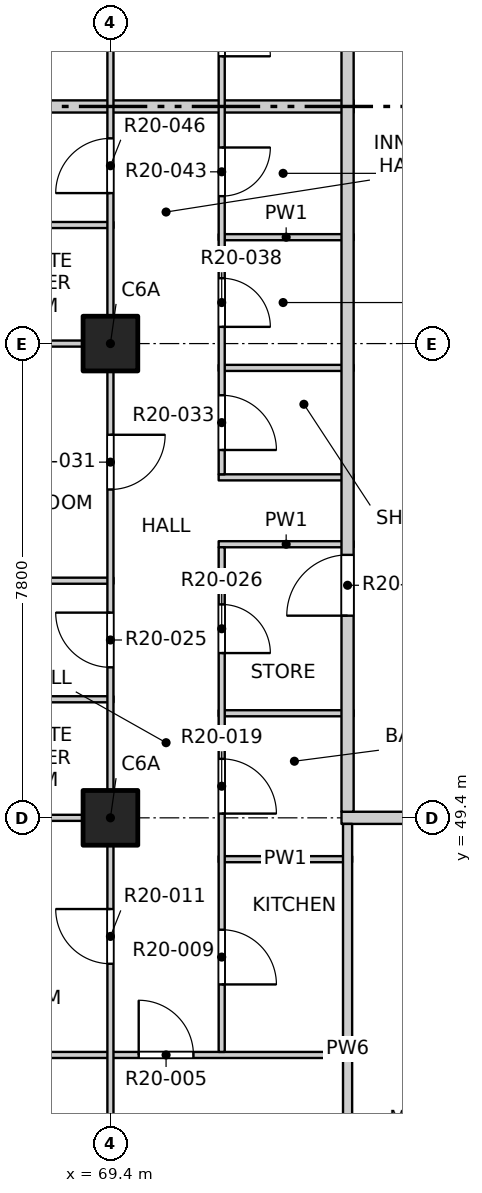
"""IFC4 building model, lengths in metres.
Left out: names, types, materials, properties, quantities, classifications, styles, units other than length and angle.
Written with IfcOpenShell. Run it as: python <this file> out.ifc"""

import sys

from ifc_helpers import new_model, si_unit, direction, frame, frame_2d, origin, origin_2d, place, context, subcontext, project, spatial, rectangle, extrude, element, fill, save


model = new_model("IFC4")
c1 = context("Model", 3, precision=1e-05, world=origin(), true_north=direction((0.0, 1.0)))
c2 = subcontext(c1, "Body", "Model", "MODEL_VIEW")
j1 = project(units=[si_unit("LENGTHUNIT", "METRE"), si_unit("PLANEANGLEUNIT", "RADIAN")], contexts=[c1])
p1 = place(None, origin())
s1 = spatial("IfcSite", under=j1, at=p1, CompositionType="ELEMENT")
p2 = place(p1, origin())
s2 = spatial("IfcBuilding", under=s1, at=p2, CompositionType="ELEMENT")
p3 = place(p2, frame((0.0, 0.0, 210.9)))
s3 = spatial("IfcBuildingStorey", under=s2, at=p3, CompositionType="ELEMENT", Elevation=210.9)
for number, where, z_axis, x_axis in (
    (1, (69.4, 49.4, -0.25), (0.0, 0.0, 1.0), (1.0, 0.0, 0.0)),
    (2, (69.4, 57.2, -0.25), (0.0, 0.0, 1.0), (1.0, 0.0, 0.0)),
):
    element("IfcColumn", number, at=place(p3, frame(where, z_axis=z_axis, x_axis=x_axis)), inside=s3, PredefinedType="COLUMN", context=c2, shape_type="SweptSolid", body=[
        extrude(rectangle(XDim=0.9, YDim=0.9, at=origin_2d()), origin(), (0.0, 0.0, 1.0), 3.4),
    ])
p4 = place(p3, frame((61.9, 45.5, 0.0), z_axis=(0.0, 0.0, 1.0), x_axis=(1.0, 0.0, 0.0)))
e3 = element("IfcWall", 3, at=p4, inside=s3, PredefinedType="PARTITIONING", context=c2, shape_type="SweptSolid", body=[
    extrude(rectangle(XDim=11.475, YDim=0.1, at=frame_2d((5.737, 0.0))), origin(), (0.0, 0.0, 1.0), 3.15),
])
p5 = place(p4, frame((7.965, 0.0, 0.0)))
e4 = element("IfcOpeningElement", 4, at=p5, cuts=e3, PredefinedType="OPENING", context=c2, shape_type="SweptSolid", body=[
    extrude(rectangle(XDim=0.9, YDim=2.1, at=frame_2d((0.45, 1.05))), frame((0.0, 0.06, 0.0), z_axis=(0.0, -1.0, 0.0), x_axis=(1.0, 0.0, 0.0)), (0.0, 0.0, 1.0), 0.12),
])
p6 = place(p3, frame((71.18, 48.72, 0.0), z_axis=(0.0, 0.0, 1.0), x_axis=(1.0, 0.0, 0.0)))
e5 = element("IfcWall", 5, at=p6, inside=s3, PredefinedType="PARTITIONING", context=c2, shape_type="SweptSolid", body=[
    extrude(rectangle(XDim=2.195, YDim=0.1, at=frame_2d((1.097, 0.0))), origin(), (0.0, 0.0, 1.0), 3.15),
])
p7 = place(p3, frame((61.9, 49.4, 0.0), z_axis=(0.0, 0.0, 1.0), x_axis=(1.0, 0.0, 0.0)))
e6 = element("IfcWall", 6, at=p7, inside=s3, PredefinedType="PARTITIONING", context=c2, shape_type="SweptSolid", body=[
    extrude(rectangle(XDim=7.55, YDim=0.1, at=frame_2d((3.775, 0.0))), origin(), (0.0, 0.0, 1.0), 3.15),
])
p8 = place(p3, frame((73.2, 49.4, 0.0), z_axis=(0.0, 0.0, 1.0), x_axis=(1.0, 0.0, 0.0)))
e7 = element("IfcWall", 7, at=p8, inside=s3, PredefinedType="PARTITIONING", context=c2, shape_type="SweptSolid", body=[
    extrude(rectangle(XDim=23.6, YDim=0.2, at=frame_2d((11.8, 0.0))), origin(), (0.0, 0.0, 1.0), 3.15),
])
p9 = place(p8, frame((1.6, 0.0, 0.0)))
e8 = element("IfcOpeningElement", 8, at=p9, cuts=e7, PredefinedType="OPENING", context=c2, shape_type="SweptSolid", body=[
    extrude(rectangle(XDim=0.9, YDim=2.1, at=frame_2d((0.45, 1.05))), frame((0.0, 0.11, 0.0), z_axis=(0.0, -1.0, 0.0), x_axis=(1.0, 0.0, 0.0)), (0.0, 0.0, 1.0), 0.22),
])
p10 = place(p8, frame((5.5, 0.0, 0.0)))
e9 = element("IfcOpeningElement", 9, at=p10, cuts=e7, PredefinedType="OPENING", context=c2, shape_type="SweptSolid", body=[
    extrude(rectangle(XDim=0.9, YDim=2.1, at=frame_2d((0.45, 1.05))), frame((0.0, 0.11, 0.0), z_axis=(0.0, -1.0, 0.0), x_axis=(1.0, 0.0, 0.0)), (0.0, 0.0, 1.0), 0.22),
])
p11 = place(p8, frame((12.375, 0.0, 0.0)))
e10 = element("IfcOpeningElement", 10, at=p11, cuts=e7, PredefinedType="OPENING", context=c2, shape_type="SweptSolid", body=[
    extrude(rectangle(XDim=1.2, YDim=2.1, at=frame_2d((0.6, 1.05))), frame((0.0, 0.11, 0.0), z_axis=(0.0, -1.0, 0.0), x_axis=(1.0, 0.0, 0.0)), (0.0, 0.0, 1.0), 0.22),
])
p12 = place(p8, frame((20.15, 0.0, 0.0)))
e11 = element("IfcOpeningElement", 11, at=p12, cuts=e7, PredefinedType="OPENING", context=c2, shape_type="SweptSolid", body=[
    extrude(rectangle(XDim=1.2, YDim=2.1, at=frame_2d((0.6, 1.05))), frame((0.0, 0.11, 0.0), z_axis=(0.0, -1.0, 0.0), x_axis=(1.0, 0.0, 0.0)), (0.0, 0.0, 1.0), 0.22),
])
p13 = place(p3, frame((71.18, 51.12, 0.0), z_axis=(0.0, 0.0, 1.0), x_axis=(1.0, 0.0, 0.0)))
e12 = element("IfcWall", 12, at=p13, inside=s3, PredefinedType="PARTITIONING", context=c2, shape_type="SweptSolid", body=[
    extrude(rectangle(XDim=2.22, YDim=0.1, at=frame_2d((1.11, 0.0))), origin(), (0.0, 0.0, 1.0), 3.15),
])
p14 = place(p3, frame((66.05, 51.35, 0.0), z_axis=(0.0, 0.0, 1.0), x_axis=(1.0, 0.0, 0.0)))
e13 = element("IfcWall", 13, at=p14, inside=s3, PredefinedType="PARTITIONING", context=c2, shape_type="SweptSolid", body=[
    extrude(rectangle(XDim=3.4, YDim=0.1, at=frame_2d((1.7, 0.0))), origin(), (0.0, 0.0, 1.0), 3.15),
])
p15 = place(p3, frame((61.9, 53.3, 0.0), z_axis=(0.0, 0.0, 1.0), x_axis=(1.0, 0.0, 0.0)))
e14 = element("IfcWall", 14, at=p15, inside=s3, PredefinedType="PARTITIONING", context=c2, shape_type="SweptSolid", body=[
    extrude(rectangle(XDim=7.55, YDim=0.1, at=frame_2d((3.775, 0.0))), origin(), (0.0, 0.0, 1.0), 3.15),
])
for number, where, z_axis, x_axis in (
    (15, (71.18, 53.9, 0.0), (0.0, 0.0, 1.0), (1.0, 0.0, 0.0)),
    (16, (71.18, 55.0, 0.0), (0.0, 0.0, 1.0), (1.0, 0.0, 0.0)),
    (17, (71.18, 56.8, 0.0), (0.0, 0.0, 1.0), (1.0, 0.0, 0.0)),
):
    element("IfcWall", number, at=place(p3, frame(where, z_axis=z_axis, x_axis=x_axis)), inside=s3, PredefinedType="PARTITIONING", context=c2, shape_type="SweptSolid", body=[
        extrude(rectangle(XDim=2.22, YDim=0.1, at=frame_2d((1.11, 0.0))), origin(), (0.0, 0.0, 1.0), 3.15),
    ])
p16 = place(p3, frame((61.9, 57.2, 0.0), z_axis=(0.0, 0.0, 1.0), x_axis=(1.0, 0.0, 0.0)))
e18 = element("IfcWall", 18, at=p16, inside=s3, PredefinedType="PARTITIONING", context=c2, shape_type="SweptSolid", body=[
    extrude(rectangle(XDim=7.55, YDim=0.1, at=frame_2d((3.775, 0.0))), origin(), (0.0, 0.0, 1.0), 3.15),
])
p17 = place(p3, frame((71.18, 58.95, 0.0), z_axis=(0.0, 0.0, 1.0), x_axis=(1.0, 0.0, 0.0)))
e19 = element("IfcWall", 19, at=p17, inside=s3, PredefinedType="PARTITIONING", context=c2, shape_type="SweptSolid", body=[
    extrude(rectangle(XDim=2.22, YDim=0.1, at=frame_2d((1.11, 0.0))), origin(), (0.0, 0.0, 1.0), 3.15),
])
p18 = place(p3, frame((66.05, 59.15, 0.0), z_axis=(0.0, 0.0, 1.0), x_axis=(1.0, 0.0, 0.0)))
e20 = element("IfcWall", 20, at=p18, inside=s3, PredefinedType="PARTITIONING", context=c2, shape_type="SweptSolid", body=[
    extrude(rectangle(XDim=3.4, YDim=0.1, at=frame_2d((1.7, 0.0))), origin(), (0.0, 0.0, 1.0), 3.15),
])
p19 = place(p3, frame((61.9, 61.1, 0.0), z_axis=(0.0, 0.0, 1.0), x_axis=(1.0, 0.0, 0.0)))
e21 = element("IfcWall", 21, at=p19, inside=s3, PredefinedType="PARTITIONING", context=c2, shape_type="SweptSolid", body=[
    extrude(rectangle(XDim=11.5, YDim=0.2, at=frame_2d((5.75, 0.0))), origin(), (0.0, 0.0, 1.0), 2.55),
])
p20 = place(p3, frame((69.4, 41.9, 0.0), z_axis=(0.0, 0.0, 1.0), x_axis=(0.0, 1.0, 0.0)))
e22 = element("IfcWall", 22, at=p20, inside=s3, PredefinedType="PARTITIONING", context=c2, shape_type="SweptSolid", body=[
    extrude(rectangle(XDim=46.2, YDim=0.1, at=frame_2d((23.1, 0.0))), origin(), (0.0, 0.0, 1.0), 3.15),
])
p21 = place(p20, frame((1.2, 0.0, 0.0)))
e23 = element("IfcOpeningElement", 23, at=p21, cuts=e22, PredefinedType="OPENING", context=c2, shape_type="SweptSolid", body=[
    extrude(rectangle(XDim=0.9, YDim=2.1, at=frame_2d((0.45, 1.05))), frame((0.0, 0.06, 0.0), z_axis=(0.0, -1.0, 0.0), x_axis=(1.0, 0.0, 0.0)), (0.0, 0.0, 1.0), 0.12),
])
p22 = place(p20, frame((5.1, 0.0, 0.0)))
e24 = element("IfcOpeningElement", 24, at=p22, cuts=e22, PredefinedType="OPENING", context=c2, shape_type="SweptSolid", body=[
    extrude(rectangle(XDim=0.9, YDim=2.1, at=frame_2d((0.45, 1.05))), frame((0.0, 0.06, 0.0), z_axis=(0.0, -1.0, 0.0), x_axis=(1.0, 0.0, 0.0)), (0.0, 0.0, 1.0), 0.12),
])
p23 = place(p20, frame((9.975, 0.0, 0.0)))
e25 = element("IfcOpeningElement", 25, at=p23, cuts=e22, PredefinedType="OPENING", context=c2, shape_type="SweptSolid", body=[
    extrude(rectangle(XDim=0.9, YDim=2.1, at=frame_2d((0.45, 1.05))), frame((0.0, 0.06, 0.0), z_axis=(0.0, -1.0, 0.0), x_axis=(1.0, 0.0, 0.0)), (0.0, 0.0, 1.0), 0.12),
])
p24 = place(p20, frame((12.9, 0.0, 0.0)))
e26 = element("IfcOpeningElement", 26, at=p24, cuts=e22, PredefinedType="OPENING", context=c2, shape_type="SweptSolid", body=[
    extrude(rectangle(XDim=0.9, YDim=2.1, at=frame_2d((0.45, 1.05))), frame((0.0, 0.06, 0.0), z_axis=(0.0, -1.0, 0.0), x_axis=(1.0, 0.0, 0.0)), (0.0, 0.0, 1.0), 0.12),
])
p25 = place(p20, frame((17.775, 0.0, 0.0)))
e27 = element("IfcOpeningElement", 27, at=p25, cuts=e22, PredefinedType="OPENING", context=c2, shape_type="SweptSolid", body=[
    extrude(rectangle(XDim=0.9, YDim=2.1, at=frame_2d((0.45, 1.05))), frame((0.0, 0.06, 0.0), z_axis=(0.0, -1.0, 0.0), x_axis=(1.0, 0.0, 0.0)), (0.0, 0.0, 1.0), 0.12),
])
p26 = place(p20, frame((21.625, 0.0, 0.0)))
e28 = element("IfcOpeningElement", 28, at=p26, cuts=e22, PredefinedType="OPENING", context=c2, shape_type="SweptSolid", body=[
    extrude(rectangle(XDim=0.9, YDim=2.1, at=frame_2d((0.45, 1.05))), frame((0.0, 0.06, 0.0), z_axis=(0.0, -1.0, 0.0), x_axis=(1.0, 0.0, 0.0)), (0.0, 0.0, 1.0), 0.12),
])
p27 = place(p20, frame((24.6, 0.0, 0.0)))
e29 = element("IfcOpeningElement", 29, at=p27, cuts=e22, PredefinedType="OPENING", context=c2, shape_type="SweptSolid", body=[
    extrude(rectangle(XDim=0.9, YDim=2.1, at=frame_2d((0.45, 1.05))), frame((0.0, 0.06, 0.0), z_axis=(0.0, -1.0, 0.0), x_axis=(1.0, 0.0, 0.0)), (0.0, 0.0, 1.0), 0.12),
])
p28 = place(p20, frame((28.5, 0.0, 0.0)))
e30 = element("IfcOpeningElement", 30, at=p28, cuts=e22, PredefinedType="OPENING", context=c2, shape_type="SweptSolid", body=[
    extrude(rectangle(XDim=0.9, YDim=2.1, at=frame_2d((0.45, 1.05))), frame((0.0, 0.06, 0.0), z_axis=(0.0, -1.0, 0.0), x_axis=(1.0, 0.0, 0.0)), (0.0, 0.0, 1.0), 0.12),
])
p29 = place(p20, frame((33.375, 0.0, 0.0)))
e31 = element("IfcOpeningElement", 31, at=p29, cuts=e22, PredefinedType="OPENING", context=c2, shape_type="SweptSolid", body=[
    extrude(rectangle(XDim=0.9, YDim=2.1, at=frame_2d((0.45, 1.05))), frame((0.0, 0.06, 0.0), z_axis=(0.0, -1.0, 0.0), x_axis=(1.0, 0.0, 0.0)), (0.0, 0.0, 1.0), 0.12),
])
p30 = place(p20, frame((37.225, 0.0, 0.0)))
e32 = element("IfcOpeningElement", 32, at=p30, cuts=e22, PredefinedType="OPENING", context=c2, shape_type="SweptSolid", body=[
    extrude(rectangle(XDim=0.9, YDim=2.1, at=frame_2d((0.45, 1.05))), frame((0.0, 0.06, 0.0), z_axis=(0.0, -1.0, 0.0), x_axis=(1.0, 0.0, 0.0)), (0.0, 0.0, 1.0), 0.12),
])
p31 = place(p20, frame((40.2, 0.0, 0.0)))
e33 = element("IfcOpeningElement", 33, at=p31, cuts=e22, PredefinedType="OPENING", context=c2, shape_type="SweptSolid", body=[
    extrude(rectangle(XDim=0.9, YDim=2.1, at=frame_2d((0.45, 1.05))), frame((0.0, 0.06, 0.0), z_axis=(0.0, -1.0, 0.0), x_axis=(1.0, 0.0, 0.0)), (0.0, 0.0, 1.0), 0.12),
])
p32 = place(p20, frame((44.1, 0.0, 0.0)))
e34 = element("IfcOpeningElement", 34, at=p32, cuts=e22, PredefinedType="OPENING", context=c2, shape_type="SweptSolid", body=[
    extrude(rectangle(XDim=0.9, YDim=2.1, at=frame_2d((0.45, 1.05))), frame((0.0, 0.06, 0.0), z_axis=(0.0, -1.0, 0.0), x_axis=(1.0, 0.0, 0.0)), (0.0, 0.0, 1.0), 0.12),
])
p33 = place(p3, frame((71.23, 45.55, 0.0), z_axis=(0.0, 0.0, 1.0), x_axis=(0.0, 1.0, 0.0)))
e35 = element("IfcWall", 35, at=p33, inside=s3, PredefinedType="PARTITIONING", context=c2, shape_type="SweptSolid", body=[
    extrude(rectangle(XDim=8.3, YDim=0.1, at=frame_2d((4.15, 0.0))), origin(), (0.0, 0.0, 1.0), 3.15),
])
p34 = place(p33, frame((1.11, 0.0, 0.0)))
e36 = element("IfcOpeningElement", 36, at=p34, cuts=e35, PredefinedType="OPENING", context=c2, shape_type="SweptSolid", body=[
    extrude(rectangle(XDim=0.9, YDim=2.1, at=frame_2d((0.45, 1.05))), frame((0.0, 0.06, 0.0), z_axis=(0.0, -1.0, 0.0), x_axis=(1.0, 0.0, 0.0)), (0.0, 0.0, 1.0), 0.12),
])
p35 = place(p33, frame((3.92, 0.0, 0.0)))
e37 = element("IfcOpeningElement", 37, at=p35, cuts=e35, PredefinedType="OPENING", context=c2, shape_type="SweptSolid", body=[
    extrude(rectangle(XDim=0.9, YDim=2.1, at=frame_2d((0.45, 1.05))), frame((0.0, 0.06, 0.0), z_axis=(0.0, -1.0, 0.0), x_axis=(1.0, 0.0, 0.0)), (0.0, 0.0, 1.0), 0.12),
])
p36 = place(p33, frame((6.56, 0.0, 0.0)))
e38 = element("IfcOpeningElement", 38, at=p36, cuts=e35, PredefinedType="OPENING", context=c2, shape_type="SweptSolid", body=[
    extrude(rectangle(XDim=0.8, YDim=2.1, at=frame_2d((0.4, 1.05))), frame((0.0, 0.06, 0.0), z_axis=(0.0, -1.0, 0.0), x_axis=(1.0, 0.0, 0.0)), (0.0, 0.0, 1.0), 0.12),
])
p37 = place(p3, frame((71.23, 55.05, 0.0), z_axis=(0.0, 0.0, 1.0), x_axis=(0.0, 1.0, 0.0)))
e39 = element("IfcWall", 39, at=p37, inside=s3, PredefinedType="PARTITIONING", context=c2, shape_type="SweptSolid", body=[
    extrude(rectangle(XDim=18.25, YDim=0.1, at=frame_2d((9.125, 0.0))), origin(), (0.0, 0.0, 1.0), 3.15),
])
p38 = place(p37, frame((0.4, 0.0, 0.0)))
e40 = element("IfcOpeningElement", 40, at=p38, cuts=e39, PredefinedType="OPENING", context=c2, shape_type="SweptSolid", body=[
    extrude(rectangle(XDim=0.9, YDim=2.1, at=frame_2d((0.45, 1.05))), frame((0.0, 0.06, 0.0), z_axis=(0.0, -1.0, 0.0), x_axis=(1.0, 0.0, 0.0)), (0.0, 0.0, 1.0), 0.12),
])
p39 = place(p37, frame((2.425, 0.0, 0.0)))
e41 = element("IfcOpeningElement", 41, at=p39, cuts=e39, PredefinedType="OPENING", context=c2, shape_type="SweptSolid", body=[
    extrude(rectangle(XDim=0.8, YDim=2.1, at=frame_2d((0.4, 1.05))), frame((0.0, 0.06, 0.0), z_axis=(0.0, -1.0, 0.0), x_axis=(1.0, 0.0, 0.0)), (0.0, 0.0, 1.0), 0.12),
])
p40 = place(p37, frame((4.575, 0.0, 0.0)))
e42 = element("IfcOpeningElement", 42, at=p40, cuts=e39, PredefinedType="OPENING", context=c2, shape_type="SweptSolid", body=[
    extrude(rectangle(XDim=0.8, YDim=2.1, at=frame_2d((0.4, 1.05))), frame((0.0, 0.06, 0.0), z_axis=(0.0, -1.0, 0.0), x_axis=(1.0, 0.0, 0.0)), (0.0, 0.0, 1.0), 0.12),
])
p41 = place(p37, frame((6.875, 0.0, 0.0)))
e43 = element("IfcOpeningElement", 43, at=p41, cuts=e39, PredefinedType="OPENING", context=c2, shape_type="SweptSolid", body=[
    extrude(rectangle(XDim=0.8, YDim=2.1, at=frame_2d((0.4, 1.05))), frame((0.0, 0.06, 0.0), z_axis=(0.0, -1.0, 0.0), x_axis=(1.0, 0.0, 0.0)), (0.0, 0.0, 1.0), 0.12),
])
p42 = place(p37, frame((9.25, 0.0, 0.0)))
e44 = element("IfcOpeningElement", 44, at=p42, cuts=e39, PredefinedType="OPENING", context=c2, shape_type="SweptSolid", body=[
    extrude(rectangle(XDim=0.8, YDim=2.1, at=frame_2d((0.4, 1.05))), frame((0.0, 0.06, 0.0), z_axis=(0.0, -1.0, 0.0), x_axis=(1.0, 0.0, 0.0)), (0.0, 0.0, 1.0), 0.12),
])
p43 = place(p37, frame((11.7, 0.0, 0.0)))
e45 = element("IfcOpeningElement", 45, at=p43, cuts=e39, PredefinedType="OPENING", context=c2, shape_type="SweptSolid", body=[
    extrude(rectangle(XDim=0.8, YDim=2.1, at=frame_2d((0.4, 1.05))), frame((0.0, 0.06, 0.0), z_axis=(0.0, -1.0, 0.0), x_axis=(1.0, 0.0, 0.0)), (0.0, 0.0, 1.0), 0.12),
])
p44 = place(p37, frame((13.865, 0.0, 0.0)))
e46 = element("IfcOpeningElement", 46, at=p44, cuts=e39, PredefinedType="OPENING", context=c2, shape_type="SweptSolid", body=[
    extrude(rectangle(XDim=0.9, YDim=2.1, at=frame_2d((0.45, 1.05))), frame((0.0, 0.06, 0.0), z_axis=(0.0, -1.0, 0.0), x_axis=(1.0, 0.0, 0.0)), (0.0, 0.0, 1.0), 0.12),
])
p45 = place(p37, frame((16.315, 0.0, 0.0)))
e47 = element("IfcOpeningElement", 47, at=p45, cuts=e39, PredefinedType="OPENING", context=c2, shape_type="SweptSolid", body=[
    extrude(rectangle(XDim=0.9, YDim=2.1, at=frame_2d((0.45, 1.05))), frame((0.0, 0.06, 0.0), z_axis=(0.0, -1.0, 0.0), x_axis=(1.0, 0.0, 0.0)), (0.0, 0.0, 1.0), 0.12),
])
p46 = place(p3, frame((73.3, 41.9, 0.0), z_axis=(0.0, 0.0, 1.0), x_axis=(0.0, 1.0, 0.0)))
e48 = element("IfcWall", 48, at=p46, inside=s3, PredefinedType="PARTITIONING", context=c2, shape_type="SweptSolid", body=[
    extrude(rectangle(XDim=7.4, YDim=0.15, at=frame_2d((3.7, 0.0))), origin(), (0.0, 0.0, 1.0), 3.15),
])
p47 = place(p3, frame((73.3, 49.5, 0.0), z_axis=(0.0, 0.0, 1.0), x_axis=(0.0, 1.0, 0.0)))
e49 = element("IfcWall", 49, at=p47, inside=s3, PredefinedType="PARTITIONING", context=c2, shape_type="SweptSolid", body=[
    extrude(rectangle(XDim=34.9, YDim=0.2, at=frame_2d((17.45, 0.0))), origin(), (0.0, 0.0, 1.0), 3.15),
])
p48 = place(p47, frame((3.225, 0.0, 0.0)))
e50 = element("IfcOpeningElement", 50, at=p48, cuts=e49, PredefinedType="OPENING", context=c2, shape_type="SweptSolid", body=[
    extrude(rectangle(XDim=1.0, YDim=2.1, at=frame_2d((0.5, 1.05))), frame((0.0, 0.11, 0.0), z_axis=(0.0, -1.0, 0.0), x_axis=(1.0, 0.0, 0.0)), (0.0, 0.0, 1.0), 0.22),
])
p49 = place(p47, frame((25.125, 0.0, 0.0)))
e51 = element("IfcOpeningElement", 51, at=p49, cuts=e49, PredefinedType="OPENING", context=c2, shape_type="SweptSolid", body=[
    extrude(rectangle(XDim=1.0, YDim=2.1, at=frame_2d((0.5, 1.05))), frame((0.0, 0.11, 0.0), z_axis=(0.0, -1.0, 0.0), x_axis=(1.0, 0.0, 0.0)), (0.0, 0.0, 1.0), 0.22),
])
p50 = place(p47, frame((31.475, 0.0, 0.0)))
e52 = element("IfcOpeningElement", 52, at=p50, cuts=e49, PredefinedType="OPENING", context=c2, shape_type="SweptSolid", body=[
    extrude(rectangle(XDim=1.0, YDim=2.1, at=frame_2d((0.5, 1.05))), frame((0.0, 0.11, 0.0), z_axis=(0.0, -1.0, 0.0), x_axis=(1.0, 0.0, 0.0)), (0.0, 0.0, 1.0), 0.22),
])
p51 = place(p5, origin())
e53 = element("IfcDoor", 53, at=p51, inside=s3, OperationType="SINGLE_SWING_LEFT", PredefinedType="DOOR", context=c2, shape_type="SweptSolid", body=[
    extrude(rectangle(XDim=0.9, YDim=2.1, at=frame_2d((0.45, 1.05))), frame((0.0, 0.025, 0.0), z_axis=(0.0, -1.0, 0.0), x_axis=(1.0, 0.0, 0.0)), (0.0, 0.0, 1.0), 0.05),
])
fill(e4, e53)
p52 = place(p34, origin())
e54 = element("IfcDoor", 54, at=p52, inside=s3, OperationType="SINGLE_SWING_RIGHT", PredefinedType="DOOR", context=c2, shape_type="SweptSolid", body=[
    extrude(rectangle(XDim=0.9, YDim=2.1, at=frame_2d((0.45, 1.05))), frame((0.0, 0.025, 0.0), z_axis=(0.0, -1.0, 0.0), x_axis=(1.0, 0.0, 0.0)), (0.0, 0.0, 1.0), 0.05),
])
fill(e36, e54)
p53 = place(p22, origin())
e55 = element("IfcDoor", 55, at=p53, inside=s3, OperationType="SINGLE_SWING_RIGHT", PredefinedType="DOOR", context=c2, shape_type="SweptSolid", body=[
    extrude(rectangle(XDim=0.9, YDim=2.1, at=frame_2d((0.45, 1.05))), frame((0.0, 0.025, 0.0), z_axis=(0.0, -1.0, 0.0), x_axis=(1.0, 0.0, 0.0)), (0.0, 0.0, 1.0), 0.05),
])
fill(e24, e55)
p54 = place(p35, origin())
e56 = element("IfcDoor", 56, at=p54, inside=s3, OperationType="SINGLE_SWING_RIGHT", PredefinedType="DOOR", context=c2, shape_type="SweptSolid", body=[
    extrude(rectangle(XDim=0.9, YDim=2.1, at=frame_2d((0.45, 1.05))), frame((0.0, 0.025, 0.0), z_axis=(0.0, -1.0, 0.0), x_axis=(1.0, 0.0, 0.0)), (0.0, 0.0, 1.0), 0.05),
])
fill(e37, e56)
p55 = place(p23, origin())
e57 = element("IfcDoor", 57, at=p55, inside=s3, OperationType="SINGLE_SWING_RIGHT", PredefinedType="DOOR", context=c2, shape_type="SweptSolid", body=[
    extrude(rectangle(XDim=0.9, YDim=2.1, at=frame_2d((0.45, 1.05))), frame((0.0, 0.025, 0.0), z_axis=(0.0, -1.0, 0.0), x_axis=(1.0, 0.0, 0.0)), (0.0, 0.0, 1.0), 0.05),
])
fill(e25, e57)
p56 = place(p36, origin())
e58 = element("IfcDoor", 58, at=p56, inside=s3, OperationType="SINGLE_SWING_RIGHT", PredefinedType="DOOR", context=c2, shape_type="SweptSolid", body=[
    extrude(rectangle(XDim=0.8, YDim=2.1, at=frame_2d((0.4, 1.05))), frame((0.0, 0.025, 0.0), z_axis=(0.0, -1.0, 0.0), x_axis=(1.0, 0.0, 0.0)), (0.0, 0.0, 1.0), 0.05),
])
fill(e38, e58)
p57 = place(p48, origin())
e59 = element("IfcDoor", 59, at=p57, inside=s3, OperationType="SINGLE_SWING_LEFT", PredefinedType="DOOR", context=c2, shape_type="SweptSolid", body=[
    extrude(rectangle(XDim=1.0, YDim=2.1, at=frame_2d((0.5, 1.05))), frame((0.0, 0.025, 0.0), z_axis=(0.0, -1.0, 0.0), x_axis=(1.0, 0.0, 0.0)), (0.0, 0.0, 1.0), 0.05),
])
fill(e50, e59)
p58 = place(p24, origin())
e60 = element("IfcDoor", 60, at=p58, inside=s3, OperationType="SINGLE_SWING_LEFT", PredefinedType="DOOR", context=c2, shape_type="SweptSolid", body=[
    extrude(rectangle(XDim=0.9, YDim=2.1, at=frame_2d((0.45, 1.05))), frame((0.0, 0.025, 0.0), z_axis=(0.0, -1.0, 0.0), x_axis=(1.0, 0.0, 0.0)), (0.0, 0.0, 1.0), 0.05),
])
fill(e26, e60)
p59 = place(p38, origin())
e61 = element("IfcDoor", 61, at=p59, inside=s3, OperationType="SINGLE_SWING_RIGHT", PredefinedType="DOOR", context=c2, shape_type="SweptSolid", body=[
    extrude(rectangle(XDim=0.9, YDim=2.1, at=frame_2d((0.45, 1.05))), frame((0.0, 0.025, 0.0), z_axis=(0.0, -1.0, 0.0), x_axis=(1.0, 0.0, 0.0)), (0.0, 0.0, 1.0), 0.05),
])
fill(e40, e61)
p60 = place(p39, origin())
e62 = element("IfcDoor", 62, at=p60, inside=s3, OperationType="SINGLE_SWING_RIGHT", PredefinedType="DOOR", context=c2, shape_type="SweptSolid", body=[
    extrude(rectangle(XDim=0.8, YDim=2.1, at=frame_2d((0.4, 1.05))), frame((0.0, 0.025, 0.0), z_axis=(0.0, -1.0, 0.0), x_axis=(1.0, 0.0, 0.0)), (0.0, 0.0, 1.0), 0.05),
])
fill(e41, e62)
p61 = place(p40, origin())
e63 = element("IfcDoor", 63, at=p61, inside=s3, OperationType="SINGLE_SWING_LEFT", PredefinedType="DOOR", context=c2, shape_type="SweptSolid", body=[
    extrude(rectangle(XDim=0.8, YDim=2.1, at=frame_2d((0.4, 1.05))), frame((0.0, 0.025, 0.0), z_axis=(0.0, -1.0, 0.0), x_axis=(1.0, 0.0, 0.0)), (0.0, 0.0, 1.0), 0.05),
])
fill(e42, e63)
p62 = place(p25, origin())
e64 = element("IfcDoor", 64, at=p62, inside=s3, OperationType="SINGLE_SWING_LEFT", PredefinedType="DOOR", context=c2, shape_type="SweptSolid", body=[
    extrude(rectangle(XDim=0.9, YDim=2.1, at=frame_2d((0.45, 1.05))), frame((0.0, 0.025, 0.0), z_axis=(0.0, -1.0, 0.0), x_axis=(1.0, 0.0, 0.0)), (0.0, 0.0, 1.0), 0.05),
])
fill(e27, e64)
p63 = place(p41, origin())
e65 = element("IfcDoor", 65, at=p63, inside=s3, OperationType="SINGLE_SWING_RIGHT", PredefinedType="DOOR", context=c2, shape_type="SweptSolid", body=[
    extrude(rectangle(XDim=0.8, YDim=2.1, at=frame_2d((0.4, 1.05))), frame((0.0, 0.025, 0.0), z_axis=(0.0, -1.0, 0.0), x_axis=(1.0, 0.0, 0.0)), (0.0, 0.0, 1.0), 0.05),
])
fill(e43, e65)
save(model, sys.argv[1])
